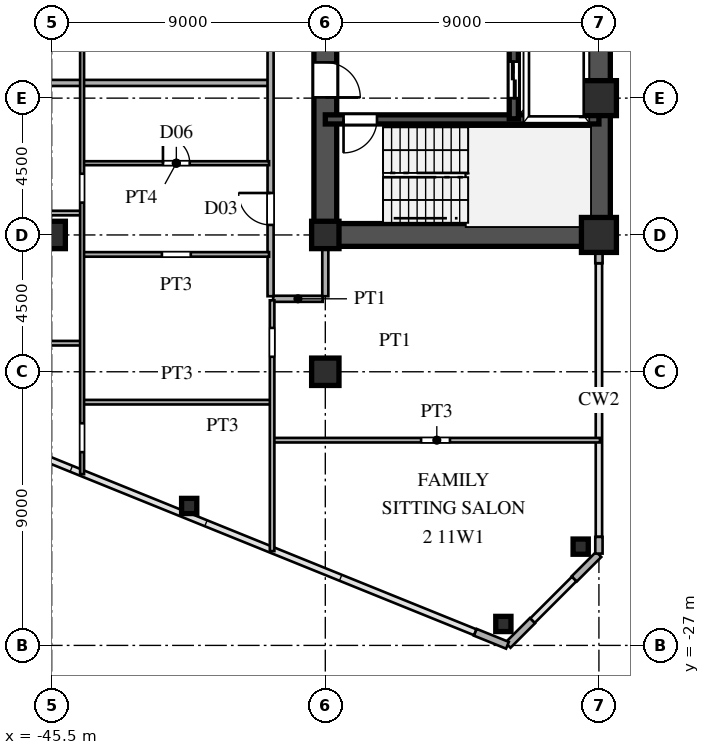
"""IFC4 building model, lengths in metres.
Left out: names, types, materials, properties, quantities, classifications, styles, units other than length and angle.
Written with IfcOpenShell. Run it as: python <this file> out.ifc"""

import sys

from ifc_helpers import new_model, si_unit, direction, frame, frame_2d, origin, origin_2d, place, context, subcontext, project, spatial, rectangle, hollow_rectangle, i_section, extrude, source, transform, mapped, element, fill, save


model = new_model("IFC4")
c1 = context("Model", 3, precision=1e-05, world=origin(), true_north=direction((0.0, 1.0)))
c2 = subcontext(c1, "Body", "Model", "MODEL_VIEW")
j1 = project(units=[si_unit("LENGTHUNIT", "METRE"), si_unit("PLANEANGLEUNIT", "RADIAN")], contexts=[c1])
p1 = place(None, origin())
s1 = spatial("IfcSite", under=j1, at=p1, CompositionType="ELEMENT")
p2 = place(p1, origin())
s2 = spatial("IfcBuilding", under=s1, at=p2, CompositionType="ELEMENT")
p3 = place(p2, frame((0.0, 0.0, 44.1)))
s3 = spatial("IfcBuildingStorey", under=s2, at=p3, CompositionType="ELEMENT", Elevation=44.1)
m1 = source(origin(), c2, "Body", "SweptSolid", [
    extrude(hollow_rectangle(XDim=1.15, YDim=1.15, WallThickness=0.048, at=origin_2d()), origin(), (0.0, 0.0, 1.0), 3.6),
])
for number, where, z_axis, x_axis in (
    (1, (-27.5, -13.5, 0.0), (0.0, 0.0, 1.0), (1.0, 0.0, 0.0)),
    (2, (-27.5, -9.0, 0.0), (0.0, 0.0, 1.0), (1.0, 0.0, 0.0)),
):
    element("IfcColumn", number, at=place(p3, frame(where, z_axis=z_axis, x_axis=x_axis)), inside=s3, PredefinedType="COLUMN", context=c2, shape_type="MappedRepresentation", body=[
        mapped(m1, transform((0.0, 0.0, 0.0), scale=1.0)),
    ])
m2 = source(origin(), c2, "Body", "SweptSolid", [
    extrude(i_section(OverallWidth=0.9, OverallDepth=0.9, WebThickness=0.036, FlangeThickness=0.055, at=origin_2d()), origin(), (0.0, 0.0, 1.0), 3.6),
])
for number, where, z_axis, x_axis in (
    (3, (-36.5, -18.0, 0.0), (0.0, 0.0, 1.0), (1.0, 0.0, 0.0)),
    (4, (-36.5, -13.5, 0.0), (0.0, 0.0, 1.0), (1.0, 0.0, 0.0)),
    (5, (-45.5, -13.5, 0.0), (0.0, 0.0, 1.0), (1.0, 0.0, 0.0)),
):
    element("IfcColumn", number, at=place(p3, frame(where, z_axis=z_axis, x_axis=x_axis)), inside=s3, PredefinedType="COLUMN", context=c2, shape_type="MappedRepresentation", body=[
        mapped(m2, transform((0.0, 0.0, 0.0), scale=1.0)),
    ])
m3 = source(origin(), c2, "Body", "SweptSolid", [
    extrude(hollow_rectangle(XDim=0.5, YDim=0.5, WallThickness=0.02, at=origin_2d()), origin(), (0.0, 0.0, 1.0), 3.6),
])
for number, where, z_axis, x_axis in (
    (6, (-28.1, -23.751, 0.0), (0.0, 0.0, 1.0), (1.0, 0.0, 0.0)),
    (7, (-30.643, -26.295, 0.0), (0.0, 0.0, 1.0), (1.0, 0.0, 0.0)),
    (8, (-40.977, -22.414, 0.0), (0.0, 0.0, 1.0), (1.0, 0.0, 0.0)),
):
    element("IfcColumn", number, at=place(p3, frame(where, z_axis=z_axis, x_axis=x_axis)), inside=s3, PredefinedType="COLUMN", context=c2, shape_type="MappedRepresentation", body=[
        mapped(m3, transform((0.0, 0.0, 0.0), scale=1.0)),
    ])
p4 = place(p3, frame((-27.5, -23.98, 0.0), z_axis=(0.0, 0.0, 1.0), x_axis=(0.0, 1.0, 0.0)))
e9 = element("IfcWall", 9, at=p4, inside=s3, PredefinedType="SOLIDWALL", context=c2, shape_type="SweptSolid", body=[
    extrude(rectangle(XDim=0.55, YDim=0.24, at=frame_2d((0.275, 0.0))), origin(), (0.0, 0.0, 1.0), 3.38),
])
p5 = place(p3, frame((-27.5, -14.43, 0.0), z_axis=(0.0, 0.0, 1.0), x_axis=(0.0, 1.0, 0.0)))
e10 = element("IfcWall", 10, at=p5, inside=s3, PredefinedType="SOLIDWALL", context=c2, shape_type="SweptSolid", body=[
    extrude(rectangle(XDim=0.55, YDim=0.24, at=frame_2d((0.275, 0.0))), origin(), (0.0, 0.0, 1.0), 2.88),
])
p6 = place(p3, frame((-31.566, -26.569, 0.0), z_axis=(0.0, 0.0, 1.0), x_axis=(0.927007103665, -0.375043770452, 0.0)))
e11 = element("IfcWall", 11, at=p6, inside=s3, PredefinedType="SOLIDWALL", context=c2, shape_type="SweptSolid", body=[
    extrude(rectangle(XDim=1.14, YDim=0.24, at=frame_2d((0.57, 0.0))), origin(), (0.0, 0.0, 1.0), 3.38),
])
for number, where, z_axis, x_axis in (
    (12, (-30.493, -26.993, 0.0), (0.0, 0.0, 1.0), (0.707, 0.707, 0.0)),
    (13, (-28.313, -24.813, 0.0), (0.0, 0.0, 1.0), (0.707, 0.707, 0.0)),
):
    element("IfcWall", number, at=place(p3, frame(where, z_axis=z_axis, x_axis=x_axis)), inside=s3, PredefinedType="SOLIDWALL", context=c2, shape_type="SweptSolid", body=[
        extrude(rectangle(XDim=1.14, YDim=0.24, at=frame_2d((0.57, 0.0))), origin(), (0.0, 0.0, 1.0), 3.38),
    ])
p7 = place(p3, frame((-27.5, -13.5, 0.0), z_axis=(0.0, 0.0, 1.0), x_axis=(0.0, 1.0, 0.0)))
e14 = element("IfcWall", 14, at=p7, inside=s3, PredefinedType="SHEAR", context=c2, shape_type="SweptSolid", body=[
    extrude(rectangle(XDim=12.2, YDim=0.75, at=frame_2d((6.1, 0.0))), origin(), (0.0, 0.0, 1.0), 3.38),
])
p8 = place(p3, frame((-36.5, -13.5, 0.0), z_axis=(0.0, 0.0, 1.0), x_axis=(1.0, 0.0, 0.0)))
e15 = element("IfcWall", 15, at=p8, inside=s3, PredefinedType="SHEAR", context=c2, shape_type="SweptSolid", body=[
    extrude(rectangle(XDim=9.0, YDim=0.75, at=frame_2d((4.5, 0.0))), origin(), (0.0, 0.0, 1.0), 3.38),
])
p9 = place(p3, frame((-36.5, -13.65, 0.0), z_axis=(0.0, 0.0, 1.0), x_axis=(0.0, 1.0, 0.0)))
e16 = element("IfcWall", 16, at=p9, inside=s3, PredefinedType="SHEAR", context=c2, shape_type="SweptSolid", body=[
    extrude(rectangle(XDim=7.15, YDim=0.75, at=frame_2d((3.575, 0.0))), origin(), (0.0, 0.0, 1.0), 3.38),
])
p10 = place(p9, frame((4.675, 0.0, 0.0)))
e17 = element("IfcOpeningElement", 17, at=p10, cuts=e16, PredefinedType="OPENING", context=c2, shape_type="SweptSolid", body=[
    extrude(rectangle(XDim=1.15, YDim=2.2, at=frame_2d((0.575, 1.1))), frame((0.0, 0.385, 0.0), z_axis=(0.0, -1.0, 0.0), x_axis=(1.0, 0.0, 0.0)), (0.0, 0.0, 1.0), 0.77),
])
p11 = place(p3, frame((-36.5, -9.7, 0.0), z_axis=(0.0, 0.0, 1.0), x_axis=(1.0, 0.0, 0.0)))
e18 = element("IfcWall", 18, at=p11, inside=s3, PredefinedType="SHEAR", context=c2, shape_type="SweptSolid", body=[
    extrude(rectangle(XDim=9.0, YDim=0.3, at=frame_2d((4.5, 0.0))), origin(), (0.0, 0.0, 1.0), 3.38),
])
p12 = place(p11, frame((0.6, 0.0, 0.0)))
e19 = element("IfcOpeningElement", 19, at=p12, cuts=e18, PredefinedType="OPENING", context=c2, shape_type="SweptSolid", body=[
    extrude(rectangle(XDim=1.1, YDim=2.2, at=frame_2d((0.55, 1.1))), frame((0.0, 0.16, 0.0), z_axis=(0.0, -1.0, 0.0), x_axis=(1.0, 0.0, 0.0)), (0.0, 0.0, 1.0), 0.32),
])
p13 = place(p3, frame((-30.3, -9.68, 0.0), z_axis=(0.0, 0.0, 1.0), x_axis=(0.0, 1.0, 0.0)))
e20 = element("IfcWall", 20, at=p13, inside=s3, PredefinedType="SHEAR", context=c2, shape_type="SweptSolid", body=[
    extrude(rectangle(XDim=2.56, YDim=0.3, at=frame_2d((1.28, 0.0))), origin(), (0.0, 0.0, 1.0), 3.38),
])
p14 = place(p13, frame((0.68, 0.0, 0.0)))
e21 = element("IfcOpeningElement", 21, at=p14, cuts=e20, PredefinedType="OPENING", context=c2, shape_type="SweptSolid", body=[
    extrude(rectangle(XDim=1.2, YDim=2.25, at=frame_2d((0.6, 1.125))), frame((0.0, 0.16, 0.0), z_axis=(0.0, -1.0, 0.0), x_axis=(1.0, 0.0, 0.0)), (0.0, 0.0, 1.0), 0.32),
])
p15 = place(p3, frame((-38.2, -20.25, 0.0), z_axis=(0.0, 0.0, 1.0), x_axis=(1.0, 0.0, 0.0)))
e22 = element("IfcWall", 22, at=p15, inside=s3, PredefinedType="PARTITIONING", context=c2, shape_type="SweptSolid", body=[
    extrude(rectangle(XDim=10.735, YDim=0.15, at=frame_2d((5.367, 0.0))), origin(), (0.0, 0.0, 1.0), 3.38),
])
p16 = place(p15, frame((4.85, 0.0, 0.0)))
e23 = element("IfcOpeningElement", 23, at=p16, cuts=e22, PredefinedType="OPENING", context=c2, shape_type="SweptSolid", body=[
    extrude(rectangle(XDim=0.95, YDim=2.15, at=frame_2d((0.475, 1.075))), frame((0.0, 0.085, 0.0), z_axis=(0.0, -1.0, 0.0), x_axis=(1.0, 0.0, 0.0)), (0.0, 0.0, 1.0), 0.17),
])
p17 = place(p3, frame((-44.45, -19.0, 0.0), z_axis=(0.0, 0.0, 1.0), x_axis=(1.0, 0.0, 0.0)))
e24 = element("IfcWall", 24, at=p17, inside=s3, PredefinedType="PARTITIONING", context=c2, shape_type="SweptSolid", body=[
    extrude(rectangle(XDim=6.15, YDim=0.15, at=frame_2d((3.075, 0.0))), origin(), (0.0, 0.0, 1.0), 3.38),
])
p18 = place(p3, frame((-54.45, -17.06, 0.0), z_axis=(0.0, 0.0, 1.0), x_axis=(1.0, 0.0, 0.0)))
e25 = element("IfcWall", 25, at=p18, inside=s3, PredefinedType="PARTITIONING", context=c2, shape_type="SweptSolid", body=[
    extrude(rectangle(XDim=9.9, YDim=0.15, at=frame_2d((4.95, 0.0))), origin(), (0.0, 0.0, 1.0), 3.38),
])
p19 = place(p18, frame((4.475, 0.0, 0.0)))
e26 = element("IfcOpeningElement", 26, at=p19, cuts=e25, PredefinedType="OPENING", context=c2, shape_type="SweptSolid", body=[
    extrude(rectangle(XDim=0.95, YDim=2.15, at=frame_2d((0.475, 1.075))), frame((0.0, 0.085, 0.0), z_axis=(0.0, -1.0, 0.0), x_axis=(1.0, 0.0, 0.0)), (0.0, 0.0, 1.0), 0.17),
])
p20 = place(p3, frame((-38.215, -15.6, 0.0), z_axis=(0.0, 0.0, 1.0), x_axis=(1.0, 0.0, 0.0)))
e27 = element("IfcWall", 27, at=p20, inside=s3, PredefinedType="PARTITIONING", context=c2, shape_type="SweptSolid", body=[
    extrude(rectangle(XDim=1.63, YDim=0.2, at=frame_2d((0.815, 0.0))), origin(), (0.0, 0.0, 1.0), 3.38),
])
p21 = place(p3, frame((-44.45, -14.14, 0.0), z_axis=(0.0, 0.0, 1.0), x_axis=(1.0, 0.0, 0.0)))
e28 = element("IfcWall", 28, at=p21, inside=s3, PredefinedType="PARTITIONING", context=c2, shape_type="SweptSolid", body=[
    extrude(rectangle(XDim=6.1, YDim=0.15, at=frame_2d((3.05, 0.0))), origin(), (0.0, 0.0, 1.0), 3.38),
])
p22 = place(p21, frame((2.575, 0.0, 0.0)))
e29 = element("IfcOpeningElement", 29, at=p22, cuts=e28, PredefinedType="OPENING", context=c2, shape_type="SweptSolid", body=[
    extrude(rectangle(XDim=0.95, YDim=2.15, at=frame_2d((0.475, 1.075))), frame((0.0, 0.085, 0.0), z_axis=(0.0, -1.0, 0.0), x_axis=(1.0, 0.0, 0.0)), (0.0, 0.0, 1.0), 0.17),
])
p23 = place(p3, frame((-65.672, -12.78, 0.0), z_axis=(0.0, 0.0, 1.0), x_axis=(1.0, 0.0, 0.0)))
e30 = element("IfcWall", 30, at=p23, inside=s3, PredefinedType="PARTITIONING", context=c2, shape_type="SweptSolid", body=[
    extrude(rectangle(XDim=21.122, YDim=0.15, at=frame_2d((10.561, 0.0))), origin(), (0.0, 0.0, 1.0), 3.38),
])
p24 = place(p23, frame((15.697, 0.0, 0.0)))
e31 = element("IfcOpeningElement", 31, at=p24, cuts=e30, PredefinedType="OPENING", context=c2, shape_type="SweptSolid", body=[
    extrude(rectangle(XDim=0.95, YDim=2.15, at=frame_2d((0.475, 1.075))), frame((0.0, 0.085, 0.0), z_axis=(0.0, -1.0, 0.0), x_axis=(1.0, 0.0, 0.0)), (0.0, 0.0, 1.0), 0.17),
])
p25 = place(p23, frame((7.847, 0.0, 0.0)))
e32 = element("IfcOpeningElement", 32, at=p25, cuts=e30, PredefinedType="OPENING", context=c2, shape_type="SweptSolid", body=[
    extrude(rectangle(XDim=0.95, YDim=2.15, at=frame_2d((0.475, 1.075))), frame((0.0, 0.085, 0.0), z_axis=(0.0, -1.0, 0.0), x_axis=(1.0, 0.0, 0.0)), (0.0, 0.0, 1.0), 0.17),
])
p26 = place(p3, frame((-44.45, -11.14, 0.0), z_axis=(0.0, 0.0, 1.0), x_axis=(1.0, 0.0, 0.0)))
e33 = element("IfcWall", 33, at=p26, inside=s3, PredefinedType="PARTITIONING", context=c2, shape_type="SweptSolid", body=[
    extrude(rectangle(XDim=6.1, YDim=0.13, at=frame_2d((3.05, 0.0))), origin(), (0.0, 0.0, 1.0), 3.38),
])
p27 = place(p26, frame((2.61, 0.0, 0.0)))
e34 = element("IfcOpeningElement", 34, at=p27, cuts=e33, PredefinedType="OPENING", context=c2, shape_type="SweptSolid", body=[
    extrude(rectangle(XDim=0.88, YDim=2.1, at=frame_2d((0.44, 1.05))), frame((0.0, 0.075, 0.0), z_axis=(0.0, -1.0, 0.0), x_axis=(1.0, 0.0, 0.0)), (0.0, 0.0, 1.0), 0.15),
])
p28 = place(p3, frame((-72.505, -8.5, 0.0), z_axis=(0.0, 0.0, 1.0), x_axis=(1.0, 0.0, 0.0)))
e35 = element("IfcWall", 35, at=p28, inside=s3, PredefinedType="PARTITIONING", context=c2, shape_type="SweptSolid", body=[
    extrude(rectangle(XDim=34.125, YDim=0.2, at=frame_2d((17.062, 0.0))), origin(), (0.0, 0.0, 1.0), 3.38),
])
p29 = place(p3, frame((-44.5, -21.368, 0.0), z_axis=(0.0, 0.0, 1.0), x_axis=(0.0, 1.0, 0.0)))
e36 = element("IfcWall", 36, at=p29, inside=s3, PredefinedType="PARTITIONING", context=c2, shape_type="SweptSolid", body=[
    extrude(rectangle(XDim=22.151, YDim=0.13, at=frame_2d((11.075, 0.0))), origin(), (0.0, 0.0, 1.0), 3.38),
])
p30 = place(p29, frame((8.932, 0.0, 0.0)))
e37 = element("IfcOpeningElement", 37, at=p30, cuts=e36, PredefinedType="OPENING", context=c2, shape_type="SweptSolid", body=[
    extrude(rectangle(XDim=0.95, YDim=2.15, at=frame_2d((0.475, 1.075))), frame((0.0, 0.075, 0.0), z_axis=(0.0, -1.0, 0.0), x_axis=(1.0, 0.0, 0.0)), (0.0, 0.0, 1.0), 0.15),
])
p31 = place(p29, frame((0.724, 0.0, 0.0)))
e38 = element("IfcOpeningElement", 38, at=p31, cuts=e36, PredefinedType="OPENING", context=c2, shape_type="SweptSolid", body=[
    extrude(rectangle(XDim=0.95, YDim=2.15, at=frame_2d((0.475, 1.075))), frame((0.0, 0.075, 0.0), z_axis=(0.0, -1.0, 0.0), x_axis=(1.0, 0.0, 0.0)), (0.0, 0.0, 1.0), 0.15),
])
p32 = place(p29, frame((19.393, 0.0, 0.0)))
e39 = element("IfcOpeningElement", 39, at=p32, cuts=e36, PredefinedType="OPENING", context=c2, shape_type="SweptSolid", body=[
    extrude(rectangle(XDim=0.95, YDim=2.15, at=frame_2d((0.475, 1.075))), frame((0.0, 0.075, 0.0), z_axis=(0.0, -1.0, 0.0), x_axis=(1.0, 0.0, 0.0)), (0.0, 0.0, 1.0), 0.15),
])
p33 = place(p3, frame((-38.3, -15.515, 0.0), z_axis=(0.0, 0.0, 1.0), x_axis=(0.0, 1.0, 0.0)))
e40 = element("IfcWall", 40, at=p33, inside=s3, PredefinedType="PARTITIONING", context=c2, shape_type="SweptSolid", body=[
    extrude(rectangle(XDim=31.03, YDim=0.2, at=frame_2d((15.515, 0.0))), origin(), (0.0, 0.0, 1.0), 3.38),
])
p34 = place(p33, frame((2.345, 0.0, 0.0)))
e41 = element("IfcOpeningElement", 41, at=p34, cuts=e40, PredefinedType="OPENING", context=c2, shape_type="SweptSolid", body=[
    extrude(rectangle(XDim=1.05, YDim=2.25, at=frame_2d((0.525, 1.125))), frame((0.0, 0.11, 0.0), z_axis=(0.0, -1.0, 0.0), x_axis=(1.0, 0.0, 0.0)), (0.0, 0.0, 1.0), 0.22),
])
p35 = place(p33, frame((13.28, 0.0, 0.0)))
e42 = element("IfcOpeningElement", 42, at=p35, cuts=e40, PredefinedType="OPENING", context=c2, shape_type="SweptSolid", body=[
    extrude(rectangle(XDim=1.05, YDim=2.25, at=frame_2d((0.525, 1.125))), frame((0.0, 0.11, 0.0), z_axis=(0.0, -1.0, 0.0), x_axis=(1.0, 0.0, 0.0)), (0.0, 0.0, 1.0), 0.22),
])
p36 = place(p33, frame((25.567, 0.0, 0.0)))
e43 = element("IfcOpeningElement", 43, at=p36, cuts=e40, PredefinedType="OPENING", context=c2, shape_type="SweptSolid", body=[
    extrude(rectangle(XDim=1.05, YDim=2.25, at=frame_2d((0.525, 1.125))), frame((0.0, 0.11, 0.0), z_axis=(0.0, -1.0, 0.0), x_axis=(1.0, 0.0, 0.0)), (0.0, 0.0, 1.0), 0.22),
])
p37 = place(p3, frame((-38.25, -23.898, 0.0), z_axis=(0.0, 0.0, 1.0), x_axis=(0.0, 1.0, 0.0)))
e44 = element("IfcWall", 44, at=p37, inside=s3, PredefinedType="PARTITIONING", context=c2, shape_type="SweptSolid", body=[
    extrude(rectangle(XDim=8.248, YDim=0.15, at=frame_2d((4.124, 0.0))), origin(), (0.0, 0.0, 1.0), 3.38),
])
p38 = place(p37, frame((6.391, 0.0, 0.0)))
e45 = element("IfcOpeningElement", 45, at=p38, cuts=e44, PredefinedType="OPENING", context=c2, shape_type="SweptSolid", body=[
    extrude(rectangle(XDim=0.95, YDim=2.15, at=frame_2d((0.475, 1.075))), frame((0.0, 0.085, 0.0), z_axis=(0.0, -1.0, 0.0), x_axis=(1.0, 0.0, 0.0)), (0.0, 0.0, 1.0), 0.17),
])
p39 = place(p3, frame((-36.5, -15.515, 0.0), z_axis=(0.0, 0.0, 1.0), x_axis=(0.0, 1.0, 0.0)))
e46 = element("IfcWall", 46, at=p39, inside=s3, PredefinedType="PARTITIONING", context=c2, shape_type="SweptSolid", body=[
    extrude(rectangle(XDim=1.635, YDim=0.2, at=frame_2d((0.817, 0.0))), origin(), (0.0, 0.0, 1.0), 2.68),
])
m4 = source(origin(), c2, "Body", "SweptSolid", [
    extrude(rectangle(XDim=1.15, YDim=2.2, at=frame_2d((0.575, 1.1))), frame((0.0, 0.025, 0.0), z_axis=(0.0, -1.0, 0.0), x_axis=(1.0, 0.0, 0.0)), (0.0, 0.0, 1.0), 0.05),
])
p40 = place(p10, frame((1.15, 0.0, 0.0), z_axis=(0.0, 0.0, 1.0), x_axis=(-1.0, 0.0, 0.0)))
e47 = element("IfcDoor", 47, at=p40, inside=s3, OperationType="SINGLE_SWING_LEFT", PredefinedType="DOOR", context=c2, shape_type="MappedRepresentation", body=[
    mapped(m4, transform((0.0, 0.0, 0.0), scale=1.0)),
])
fill(e17, e47)
m5 = source(origin(), c2, "Body", "SweptSolid", [
    extrude(rectangle(XDim=1.1, YDim=2.2, at=frame_2d((0.55, 1.1))), frame((0.0, 0.025, 0.0), z_axis=(0.0, -1.0, 0.0), x_axis=(1.0, 0.0, 0.0)), (0.0, 0.0, 1.0), 0.05),
])
p41 = place(p12, frame((1.1, 0.0, 0.0), z_axis=(0.0, 0.0, 1.0), x_axis=(-1.0, 0.0, 0.0)))
e48 = element("IfcDoor", 48, at=p41, inside=s3, OperationType="SINGLE_SWING_LEFT", PredefinedType="DOOR", context=c2, shape_type="MappedRepresentation", body=[
    mapped(m5, transform((0.0, 0.0, 0.0), scale=1.0)),
])
fill(e19, e48)
m6 = source(origin(), c2, "Body", "SweptSolid", [
    extrude(rectangle(XDim=1.2, YDim=2.25, at=frame_2d((0.6, 1.125))), frame((0.0, 0.025, 0.0), z_axis=(0.0, -1.0, 0.0), x_axis=(1.0, 0.0, 0.0)), (0.0, 0.0, 1.0), 0.05),
])
p42 = place(p14, origin())
e49 = element("IfcDoor", 49, at=p42, inside=s3, OperationType="DOUBLE_DOOR_SLIDING", PredefinedType="DOOR", context=c2, shape_type="MappedRepresentation", body=[
    mapped(m6, transform((0.0, 0.0, 0.0), scale=1.0)),
])
fill(e21, e49)
m7 = source(origin(), c2, "Body", "SweptSolid", [
    extrude(rectangle(XDim=0.88, YDim=2.1, at=frame_2d((0.44, 1.05))), frame((0.0, 0.025, 0.0), z_axis=(0.0, -1.0, 0.0), x_axis=(1.0, 0.0, 0.0)), (0.0, 0.0, 1.0), 0.05),
])
p43 = place(p27, origin())
e50 = element("IfcDoor", 50, at=p43, inside=s3, OperationType="SINGLE_SWING_LEFT", PredefinedType="DOOR", context=c2, shape_type="MappedRepresentation", body=[
    mapped(m7, transform((0.0, 0.0, 0.0), scale=1.0)),
])
fill(e34, e50)
m8 = source(origin(), c2, "Body", "SweptSolid", [
    extrude(rectangle(XDim=1.05, YDim=2.25, at=frame_2d((0.525, 1.125))), frame((0.0, 0.025, 0.0), z_axis=(0.0, -1.0, 0.0), x_axis=(1.0, 0.0, 0.0)), (0.0, 0.0, 1.0), 0.05),
])
p44 = place(p34, origin())
e51 = element("IfcDoor", 51, at=p44, inside=s3, OperationType="SINGLE_SWING_RIGHT", PredefinedType="DOOR", context=c2, shape_type="MappedRepresentation", body=[
    mapped(m8, transform((0.0, 0.0, 0.0), scale=1.0)),
])
fill(e41, e51)
save(model, sys.argv[1])
